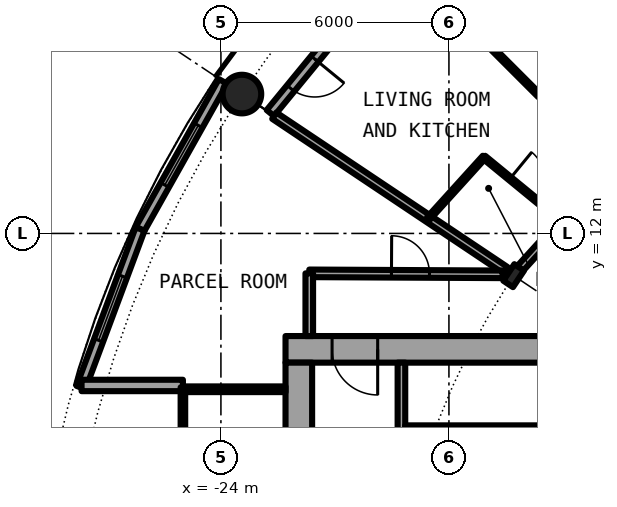
"""IFC4 building model, lengths in metres.
Left out: names, types, materials, properties, quantities, classifications, styles, units other than length and angle.
Written with IfcOpenShell. Run it as: python <this file> out.ifc"""

import sys

from ifc_helpers import new_model, si_unit, direction, frame, frame_2d, origin, origin_2d, place, context, subcontext, project, spatial, rectangle, hollow_circle, i_section, extrude, element, fill, save


model = new_model("IFC4")
c1 = context("Model", 3, precision=1e-05, world=origin(), true_north=direction((0.0, 1.0)))
c2 = subcontext(c1, "Body", "Model", "MODEL_VIEW")
j1 = project(units=[si_unit("LENGTHUNIT", "METRE"), si_unit("PLANEANGLEUNIT", "RADIAN")], contexts=[c1])
p1 = place(None, origin())
s1 = spatial("IfcSite", under=j1, at=p1, CompositionType="ELEMENT")
p2 = place(p1, origin())
s2 = spatial("IfcBuilding", under=s1, at=p2, CompositionType="ELEMENT")
p3 = place(p2, frame((0.0, 0.0, 75.8)))
s3 = spatial("IfcBuildingStorey", under=s2, at=p3, CompositionType="ELEMENT", Elevation=75.8)
p4 = place(p3, frame((-23.448, 15.667, 0.0), z_axis=(0.0, 0.0, 1.0), x_axis=(1.0, 0.0, 0.0)))
e1 = element("IfcColumn", 1, at=p4, inside=s3, PredefinedType="COLUMN", context=c2, shape_type="SweptSolid", body=[
    extrude(hollow_circle(Radius=0.508, WallThickness=0.04, at=origin_2d()), origin(), (0.0, 0.0, 1.0), 3.05),
])
p5 = place(p3, frame((-16.297, 10.889, 0.0), z_axis=(0.0, 0.0, 1.0), x_axis=(-0.831469612303, 0.55557023302, 0.0)))
e2 = element("IfcColumn", 2, at=p5, inside=s3, PredefinedType="COLUMN", context=c2, shape_type="SweptSolid", body=[
    extrude(i_section(OverallWidth=0.306, OverallDepth=0.524, WebThickness=0.021, FlangeThickness=0.04, FilletRadius=0.027, at=origin_2d()), origin(), (0.0, 0.0, 1.0), 3.05),
])
p6 = place(p3, frame((-19.304, 19.304, 0.0), z_axis=(0.0, 0.0, 1.0), x_axis=(-0.634382322723, -0.773019449054, 0.0)))
e3 = element("IfcWall", 3, at=p6, inside=s3, PredefinedType="SOLIDWALL", context=c2, shape_type="SweptSolid", body=[
    extrude(rectangle(XDim=5.352, YDim=0.25, at=frame_2d((2.676, 0.0))), origin(), (0.0, 0.0, 1.0), 2.7),
])
p7 = place(p6, frame((0.441, 0.0, 0.3)))
e4 = element("IfcOpeningElement", 4, at=p7, cuts=e3, PredefinedType="OPENING", context=c2, shape_type="SweptSolid", body=[
    extrude(rectangle(XDim=1.8, YDim=2.1, at=frame_2d((0.9, 1.05))), frame((0.0, 0.135, 0.0), z_axis=(0.0, -1.0, 0.0), x_axis=(1.0, 0.0, 0.0)), (0.0, 0.0, 1.0), 0.27),
])
p8 = place(p6, frame((3.51, 0.0, 0.0)))
e5 = element("IfcOpeningElement", 5, at=p8, cuts=e3, PredefinedType="OPENING", context=c2, shape_type="SweptSolid", body=[
    extrude(rectangle(XDim=1.0, YDim=2.2, at=frame_2d((0.5, 1.1))), frame((0.0, 0.135, 0.0), z_axis=(0.0, -1.0, 0.0), x_axis=(1.0, 0.0, 0.0)), (0.0, 0.0, 1.0), 0.27),
])
p9 = place(p3, frame((-23.946, 16.0, 0.0), z_axis=(0.0, 0.0, 1.0), x_axis=(-0.489696356642, -0.871893042919, 0.0)))
e6 = element("IfcWall", 6, at=p9, inside=s3, PredefinedType="SOLIDWALL", context=c2, shape_type="SweptSolid", body=[
    extrude(rectangle(XDim=4.454, YDim=0.25, at=frame_2d((2.227, 0.0))), origin(), (0.0, 0.0, 1.0), 2.7),
])
p10 = place(p9, frame((1.327, 0.0, 0.3)))
e7 = element("IfcOpeningElement", 7, at=p10, cuts=e6, PredefinedType="OPENING", context=c2, shape_type="SweptSolid", body=[
    extrude(rectangle(XDim=1.8, YDim=2.1, at=frame_2d((0.9, 1.05))), frame((0.0, 0.135, 0.0), z_axis=(0.0, -1.0, 0.0), x_axis=(1.0, 0.0, 0.0)), (0.0, 0.0, 1.0), 0.27),
])
p11 = place(p3, frame((-26.127, 12.117, 0.0), z_axis=(0.0, 0.0, 1.0), x_axis=(-0.349247811493, -0.937030397675, 0.0)))
e8 = element("IfcWall", 8, at=p11, inside=s3, PredefinedType="SOLIDWALL", context=c2, shape_type="SweptSolid", body=[
    extrude(rectangle(XDim=4.452, YDim=0.25, at=frame_2d((2.226, 0.0))), origin(), (0.0, 0.0, 1.0), 2.7),
])
p12 = place(p11, frame((1.327, 0.0, 0.3)))
e9 = element("IfcOpeningElement", 9, at=p12, cuts=e8, PredefinedType="OPENING", context=c2, shape_type="SweptSolid", body=[
    extrude(rectangle(XDim=1.8, YDim=2.1, at=frame_2d((0.9, 1.05))), frame((0.0, 0.135, 0.0), z_axis=(0.0, -1.0, 0.0), x_axis=(1.0, 0.0, 0.0)), (0.0, 0.0, 1.0), 0.27),
])
p13 = place(p3, frame((-25.0, 8.0, 0.0), z_axis=(0.0, 0.0, 1.0), x_axis=(-1.0, 0.0, 0.0)))
e10 = element("IfcWall", 10, at=p13, inside=s3, PredefinedType="SOLIDWALL", context=c2, shape_type="SweptSolid", body=[
    extrude(rectangle(XDim=2.667, YDim=0.3, at=frame_2d((1.333, 0.0))), origin(), (0.0, 0.0, 1.0), 2.7),
])
p14 = place(p3, frame((-8.3, 8.95, 0.0), z_axis=(0.0, 0.0, 1.0), x_axis=(-1.0, 0.0, 0.0)))
e11 = element("IfcWall", 11, at=p14, inside=s3, PredefinedType="SHEAR", context=c2, shape_type="SweptSolid", body=[
    extrude(rectangle(XDim=14.0, YDim=0.7, at=frame_2d((7.0, 0.0))), origin(), (0.0, 0.0, 1.0), 3.05),
])
p15 = place(p14, frame((11.575, 0.0, 0.0)))
e12 = element("IfcOpeningElement", 12, at=p15, cuts=e11, PredefinedType="OPENING", context=c2, shape_type="SweptSolid", body=[
    extrude(rectangle(XDim=1.2, YDim=2.3, at=frame_2d((0.6, 1.15))), frame((0.0, 0.36, 0.0), z_axis=(0.0, -1.0, 0.0), x_axis=(1.0, 0.0, 0.0)), (0.0, 0.0, 1.0), 0.72),
])
p16 = place(p3, frame((-21.95, -8.6, 0.0), z_axis=(0.0, 0.0, 1.0), x_axis=(0.0, 1.0, 0.0)))
e13 = element("IfcWall", 13, at=p16, inside=s3, PredefinedType="SHEAR", context=c2, shape_type="SweptSolid", body=[
    extrude(rectangle(XDim=17.2, YDim=0.7, at=frame_2d((8.6, 0.0))), origin(), (0.0, 0.0, 1.0), 3.05),
])
p17 = place(p16, frame((7.7, 0.0, 0.0)))
e14 = element("IfcOpeningElement", 14, at=p17, cuts=e13, PredefinedType="OPENING", context=c2, shape_type="SweptSolid", body=[
    extrude(rectangle(XDim=1.8, YDim=2.3, at=frame_2d((0.9, 1.15))), frame((0.0, 0.36, 0.0), z_axis=(0.0, -1.0, 0.0), x_axis=(1.0, 0.0, 0.0)), (0.0, 0.0, 1.0), 0.72),
])
p18 = place(p3, frame((-19.25, 8.6, 0.0), z_axis=(0.0, 0.0, 1.0), x_axis=(0.0, -1.0, 0.0)))
e15 = element("IfcWall", 15, at=p18, inside=s3, PredefinedType="SOLIDWALL", context=c2, shape_type="SweptSolid", body=[
    extrude(rectangle(XDim=7.025, YDim=0.2, at=frame_2d((3.513, 0.0))), origin(), (0.0, 0.0, 1.0), 2.7),
])
p19 = place(p18, frame((2.35, 0.0, 0.0)))
e16 = element("IfcOpeningElement", 16, at=p19, cuts=e15, PredefinedType="OPENING", context=c2, shape_type="SweptSolid", body=[
    extrude(rectangle(XDim=1.1, YDim=2.3, at=frame_2d((0.55, 1.15))), frame((0.0, 0.11, 0.0), z_axis=(0.0, -1.0, 0.0), x_axis=(1.0, 0.0, 0.0)), (0.0, 0.0, 1.0), 0.22),
])
p20 = place(p3, frame((-15.45, 6.875, 0.0), z_axis=(0.0, 0.0, 1.0), x_axis=(-1.0, 0.0, 0.0)))
e17 = element("IfcWall", 17, at=p20, inside=s3, PredefinedType="PARTITIONING", context=c2, shape_type="SweptSolid", body=[
    extrude(rectangle(XDim=3.7, YDim=0.15, at=frame_2d((1.85, 0.0))), origin(), (0.0, 0.0, 1.0), 2.7),
])
p21 = place(p20, frame((1.4, 0.0, 0.0)))
e18 = element("IfcOpeningElement", 18, at=p21, cuts=e17, PredefinedType="OPENING", context=c2, shape_type="SweptSolid", body=[
    extrude(rectangle(XDim=0.9, YDim=2.3, at=frame_2d((0.45, 1.15))), frame((0.0, 0.085, 0.0), z_axis=(0.0, -1.0, 0.0), x_axis=(1.0, 0.0, 0.0)), (0.0, 0.0, 1.0), 0.17),
])
p22 = place(p3, frame((-22.3, 7.9, 0.0), z_axis=(0.0, 0.0, 1.0), x_axis=(-1.0, 0.0, 0.0)))
e19 = element("IfcWall", 19, at=p22, inside=s3, PredefinedType="PARTITIONING", context=c2, shape_type="SweptSolid", body=[
    extrude(rectangle(XDim=2.64, YDim=0.15, at=frame_2d((1.32, 0.0))), origin(), (0.0, 0.0, 1.0), 2.7),
])
p23 = place(p3, frame((-25.0, 7.95, 0.0), z_axis=(0.0, 0.0, 1.0), x_axis=(0.0, -1.0, 0.0)))
e20 = element("IfcWall", 20, at=p23, inside=s3, PredefinedType="PARTITIONING", context=c2, shape_type="SweptSolid", body=[
    extrude(rectangle(XDim=15.9, YDim=0.12, at=frame_2d((7.95, 0.0))), origin(), (0.0, 0.0, 1.0), 2.7),
])
p24 = place(p23, frame((0.95, 0.0, 0.1)))
e21 = element("IfcOpeningElement", 21, at=p24, cuts=e20, PredefinedType="OPENING", context=c2, shape_type="SweptSolid", body=[
    extrude(rectangle(XDim=14.0, YDim=2.35, at=frame_2d((7.0, 1.175))), frame((0.0, 0.07, 0.0), z_axis=(0.0, -1.0, 0.0), x_axis=(1.0, 0.0, 0.0)), (0.0, 0.0, 1.0), 0.14),
])
p25 = place(p3, frame((-22.595, 15.098, 0.0), z_axis=(0.0, 0.0, 1.0), x_axis=(0.831382022135, -0.555701298605, 0.0)))
e22 = element("IfcWall", 22, at=p25, inside=s3, PredefinedType="PARTITIONING", context=c2, shape_type="SweptSolid", body=[
    extrude(rectangle(XDim=7.313, YDim=0.2, at=frame_2d((3.657, 0.0))), origin(), (0.0, 0.0, 1.0), 2.7),
])
p26 = place(p3, frame((-19.211, 19.221, 0.0), z_axis=(0.0, 0.0, 1.0), x_axis=(0.706914880313, -0.707298629994, 0.0)))
e23 = element("IfcWall", 23, at=p26, inside=s3, PredefinedType="PARTITIONING", context=c2, shape_type="SweptSolid", body=[
    extrude(rectangle(XDim=5.09, YDim=0.1, at=frame_2d((2.545, 0.0))), origin(), (0.0, 0.0, 1.0), 2.7),
])
p27 = place(p26, frame((2.095, 0.0, 0.0)))
e24 = element("IfcOpeningElement", 24, at=p27, cuts=e23, PredefinedType="OPENING", context=c2, shape_type="SweptSolid", body=[
    extrude(rectangle(XDim=0.9, YDim=2.3, at=frame_2d((0.45, 1.15))), frame((0.0, 0.06, 0.0), z_axis=(0.0, -1.0, 0.0), x_axis=(1.0, 0.0, 0.0)), (0.0, 0.0, 1.0), 0.12),
])
p28 = place(p3, frame((-17.243, 21.005, 0.0), z_axis=(0.0, 0.0, 1.0), x_axis=(0.63447412651, -0.772944100689, 0.0)))
e25 = element("IfcWall", 25, at=p28, inside=s3, PredefinedType="PARTITIONING", context=c2, shape_type="SweptSolid", body=[
    extrude(rectangle(XDim=7.576, YDim=0.2, at=frame_2d((3.788, 0.0))), origin(), (0.0, 0.0, 1.0), 2.7),
])
p29 = place(p3, frame((-17.078, 14.005, 0.0), z_axis=(0.0, 0.0, 1.0), x_axis=(0.773240932873, -0.634112339992, 0.0)))
e26 = element("IfcWall", 26, at=p29, inside=s3, PredefinedType="PARTITIONING", context=c2, shape_type="SweptSolid", body=[
    extrude(rectangle(XDim=2.674, YDim=0.1, at=frame_2d((1.337, 0.0))), origin(), (0.0, 0.0, 1.0), 2.7),
])
p30 = place(p29, frame((0.887, 0.0, 0.0)))
e27 = element("IfcOpeningElement", 27, at=p30, cuts=e26, PredefinedType="OPENING", context=c2, shape_type="SweptSolid", body=[
    extrude(rectangle(XDim=0.9, YDim=2.3, at=frame_2d((0.45, 1.15))), frame((0.0, 0.06, 0.0), z_axis=(0.0, -1.0, 0.0), x_axis=(1.0, 0.0, 0.0)), (0.0, 0.0, 1.0), 0.12),
])
p31 = place(p3, frame((-21.675, 10.95, 0.0), z_axis=(0.0, 0.0, 1.0), x_axis=(0.999987054722, -0.005088259783, 0.0)))
e28 = element("IfcWall", 28, at=p31, inside=s3, PredefinedType="PARTITIONING", context=c2, shape_type="SweptSolid", body=[
    extrude(rectangle(XDim=5.086, YDim=0.2, at=frame_2d((2.543, 0.0))), origin(), (0.0, 0.0, 1.0), 2.7),
])
p32 = place(p31, frame((2.163, 0.0, 0.0)))
e29 = element("IfcOpeningElement", 29, at=p32, cuts=e28, PredefinedType="OPENING", context=c2, shape_type="SweptSolid", body=[
    extrude(rectangle(XDim=1.0, YDim=2.3, at=frame_2d((0.5, 1.15))), frame((0.0, 0.11, 0.0), z_axis=(0.0, -1.0, 0.0), x_axis=(1.0, 0.0, 0.0)), (0.0, 0.0, 1.0), 0.22),
])
p33 = place(p3, frame((-16.193, 11.004, 0.0), z_axis=(0.0, 0.0, 1.0), x_axis=(0.671601747072, 0.740912338492, 0.0)))
e30 = element("IfcWall", 30, at=p33, inside=s3, PredefinedType="PARTITIONING", context=c2, shape_type="SweptSolid", body=[
    extrude(rectangle(XDim=5.597, YDim=0.2, at=frame_2d((2.799, 0.0))), origin(), (0.0, 0.0, 1.0), 2.38),
])
p34 = place(p33, frame((3.18, 0.0, 0.0)))
e31 = element("IfcOpeningElement", 31, at=p34, cuts=e30, PredefinedType="OPENING", context=c2, shape_type="SweptSolid", body=[
    extrude(rectangle(XDim=1.0, YDim=2.3, at=frame_2d((0.5, 1.15))), frame((0.0, 0.11, 0.0), z_axis=(0.0, -1.0, 0.0), x_axis=(1.0, 0.0, 0.0)), (0.0, 0.0, 1.0), 0.22),
])
p35 = place(p3, frame((-21.675, 9.3, 0.0), z_axis=(0.0, 0.0, 1.0), x_axis=(0.0, 1.0, 0.0)))
e32 = element("IfcWall", 32, at=p35, inside=s3, PredefinedType="PARTITIONING", context=c2, shape_type="SweptSolid", body=[
    extrude(rectangle(XDim=1.65, YDim=0.2, at=frame_2d((0.825, 0.0))), origin(), (0.0, 0.0, 1.0), 2.7),
])
p36 = place(p3, frame((-18.538, 12.394, 0.0), z_axis=(0.0, 0.0, 1.0), x_axis=(0.67169789574, 0.740825172937, 0.0)))
e33 = element("IfcWall", 33, at=p36, inside=s3, PredefinedType="PARTITIONING", context=c2, shape_type="SweptSolid", body=[
    extrude(rectangle(XDim=2.183, YDim=0.1, at=frame_2d((1.091, 0.0))), origin(), (0.0, 0.0, 1.0), 2.7),
])
p37 = place(p8, origin())
e34 = element("IfcDoor", 34, at=p37, inside=s3, OperationType="SINGLE_SWING_LEFT", PredefinedType="DOOR", context=c2, shape_type="SweptSolid", body=[
    extrude(rectangle(XDim=1.0, YDim=2.2, at=frame_2d((0.5, 1.1))), frame((0.0, 0.025, 0.0), z_axis=(0.0, -1.0, 0.0), x_axis=(1.0, 0.0, 0.0)), (0.0, 0.0, 1.0), 0.05),
])
fill(e5, e34)
p38 = place(p10, origin())
e35 = element("IfcWindow", 35, at=p38, inside=s3, PartitioningType="SINGLE_PANEL", PredefinedType="WINDOW", context=c2, shape_type="SweptSolid", body=[
    extrude(rectangle(XDim=1.8, YDim=2.1, at=frame_2d((0.9, 1.05))), frame((0.0, 0.03, 0.0), z_axis=(0.0, -1.0, 0.0), x_axis=(1.0, 0.0, 0.0)), (0.0, 0.0, 1.0), 0.06),
])
fill(e7, e35)
p39 = place(p12, origin())
e36 = element("IfcWindow", 36, at=p39, inside=s3, PartitioningType="SINGLE_PANEL", PredefinedType="WINDOW", context=c2, shape_type="SweptSolid", body=[
    extrude(rectangle(XDim=1.8, YDim=2.1, at=frame_2d((0.9, 1.05))), frame((0.0, 0.03, 0.0), z_axis=(0.0, -1.0, 0.0), x_axis=(1.0, 0.0, 0.0)), (0.0, 0.0, 1.0), 0.06),
])
fill(e9, e36)
p40 = place(p21, origin())
e37 = element("IfcDoor", 37, at=p40, inside=s3, OperationType="SINGLE_SWING_LEFT", PredefinedType="DOOR", context=c2, shape_type="SweptSolid", body=[
    extrude(rectangle(XDim=0.9, YDim=2.3, at=frame_2d((0.45, 1.15))), frame((0.0, 0.025, 0.0), z_axis=(0.0, -1.0, 0.0), x_axis=(1.0, 0.0, 0.0)), (0.0, 0.0, 1.0), 0.05),
])
fill(e18, e37)
p41 = place(p15, origin())
e38 = element("IfcDoor", 38, at=p41, inside=s3, OperationType="SINGLE_SWING_LEFT", PredefinedType="DOOR", context=c2, shape_type="SweptSolid", body=[
    extrude(rectangle(XDim=1.2, YDim=2.3, at=frame_2d((0.6, 1.15))), frame((0.0, 0.025, 0.0), z_axis=(0.0, -1.0, 0.0), x_axis=(1.0, 0.0, 0.0)), (0.0, 0.0, 1.0), 0.05),
])
fill(e12, e38)
p42 = place(p24, origin())
e39 = element("IfcWindow", 39, at=p42, inside=s3, PartitioningType="SINGLE_PANEL", PredefinedType="WINDOW", context=c2, shape_type="SweptSolid", body=[
    extrude(rectangle(XDim=14.0, YDim=2.35, at=frame_2d((7.0, 1.175))), frame((0.0, 0.03, 0.0), z_axis=(0.0, -1.0, 0.0), x_axis=(1.0, 0.0, 0.0)), (0.0, 0.0, 1.0), 0.06),
])
fill(e21, e39)
p43 = place(p30, origin())
e40 = element("IfcDoor", 40, at=p43, inside=s3, OperationType="SINGLE_SWING_RIGHT", PredefinedType="DOOR", context=c2, shape_type="SweptSolid", body=[
    extrude(rectangle(XDim=0.9, YDim=2.3, at=frame_2d((0.45, 1.15))), frame((0.0, 0.025, 0.0), z_axis=(0.0, -1.0, 0.0), x_axis=(1.0, 0.0, 0.0)), (0.0, 0.0, 1.0), 0.05),
])
fill(e27, e40)
p44 = place(p32, origin())
e41 = element("IfcDoor", 41, at=p44, inside=s3, OperationType="SINGLE_SWING_RIGHT", PredefinedType="DOOR", context=c2, shape_type="SweptSolid", body=[
    extrude(rectangle(XDim=1.0, YDim=2.3, at=frame_2d((0.5, 1.15))), frame((0.0, 0.025, 0.0), z_axis=(0.0, -1.0, 0.0), x_axis=(1.0, 0.0, 0.0)), (0.0, 0.0, 1.0), 0.05),
])
fill(e29, e41)
save(model, sys.argv[1])
